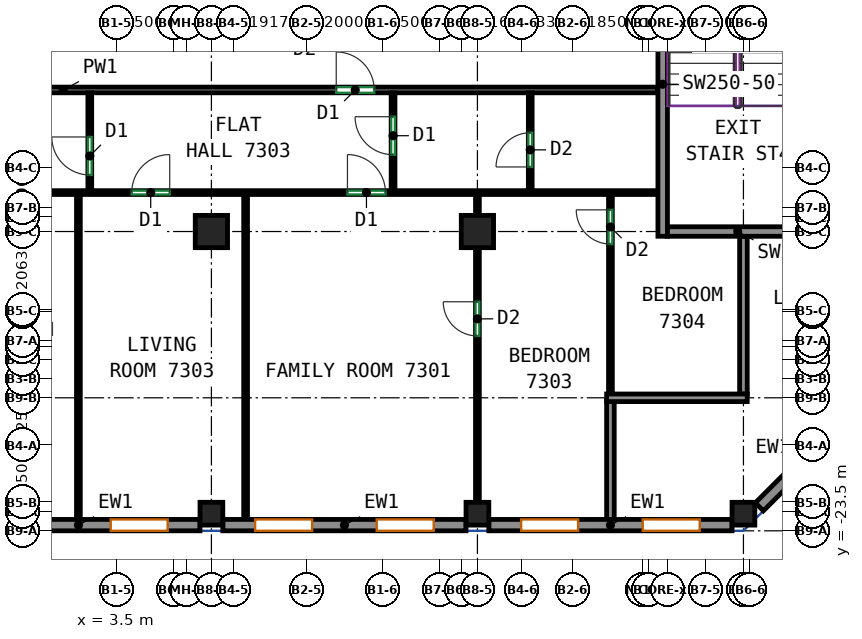
"""IFC4 building model, lengths in metres.
Left out: names, types, materials, properties, quantities, classifications, styles, units other than length and angle.
Written with IfcOpenShell. Run it as: python <this file> out.ifc"""

import sys

from ifc_helpers import new_model, si_unit, direction, frame, frame_2d, origin, origin_2d, place, context, subcontext, project, spatial, rectangle, extrude, source, transform, mapped, element, fill, save


model = new_model("IFC4")
c1 = context("Model", 3, precision=1e-05, world=origin(), true_north=direction((0.0, 1.0)))
c2 = subcontext(c1, "Body", "Model", "MODEL_VIEW")
j1 = project(units=[si_unit("LENGTHUNIT", "METRE"), si_unit("PLANEANGLEUNIT", "RADIAN")], contexts=[c1])
p1 = place(None, origin())
s1 = spatial("IfcSite", under=j1, at=p1, CompositionType="ELEMENT")
p2 = place(p1, origin())
s2 = spatial("IfcBuilding", under=s1, at=p2, CompositionType="ELEMENT")
p3 = place(p2, frame((0.0, 0.0, 295.0)))
s3 = spatial("IfcBuildingStorey", under=s2, at=p3, CompositionType="ELEMENT", Elevation=295.0)
m1 = source(origin(), c2, "Body", "SweptSolid", [
    extrude(rectangle(XDim=0.6, YDim=0.6, at=origin_2d()), origin(), (0.0, 0.0, 1.0), 3.12),
])
p4 = place(p3, frame((6.0, -23.05, 0.0), z_axis=(0.0, 0.0, 1.0), x_axis=(1.0, 0.0, 0.0)))
e1 = element("IfcColumn", 1, at=p4, inside=s3, PredefinedType="COLUMN", context=c2, shape_type="MappedRepresentation", body=[
    mapped(m1, transform((0.0, 0.0, 0.0))),
])
m2 = source(origin(), c2, "Body", "SweptSolid", [
    extrude(rectangle(XDim=0.85, YDim=0.85, at=origin_2d()), origin(), (0.0, 0.0, 1.0), 3.12),
])
p5 = place(p3, frame((6.0, -15.625, 0.0), z_axis=(0.0, 0.0, 1.0), x_axis=(1.0, 0.0, 0.0)))
e2 = element("IfcColumn", 2, at=p5, inside=s3, PredefinedType="COLUMN", context=c2, shape_type="MappedRepresentation", body=[
    mapped(m2, transform((0.0, 0.0, 0.0))),
])
p6 = place(p3, frame((13.0, -23.05, 0.0), z_axis=(0.0, 0.0, 1.0), x_axis=(1.0, 0.0, 0.0)))
e3 = element("IfcColumn", 3, at=p6, inside=s3, PredefinedType="COLUMN", context=c2, shape_type="MappedRepresentation", body=[
    mapped(m1, transform((0.0, 0.0, 0.0))),
])
p7 = place(p3, frame((13.0, -15.625, 0.0), z_axis=(0.0, 0.0, 1.0), x_axis=(1.0, 0.0, 0.0)))
e4 = element("IfcColumn", 4, at=p7, inside=s3, PredefinedType="COLUMN", context=c2, shape_type="MappedRepresentation", body=[
    mapped(m2, transform((0.0, 0.0, 0.0))),
])
p8 = place(p3, frame((20.0, -23.05, 0.0), z_axis=(0.0, 0.0, 1.0), x_axis=(1.0, 0.0, 0.0)))
e5 = element("IfcColumn", 5, at=p8, inside=s3, PredefinedType="COLUMN", context=c2, shape_type="MappedRepresentation", body=[
    mapped(m1, transform((0.0, 0.0, 0.0))),
])
m3 = source(origin(), c2, "Body", "SweptSolid", [
    extrude(rectangle(XDim=8.0, YDim=0.25, at=frame_2d((4.0, 0.0))), origin(), (0.0, 0.0, 1.0), 3.12),
])
p9 = place(p3, frame((17.875, -15.75, 0.0), z_axis=(0.0, 0.0, 1.0), x_axis=(0.0, 1.0, 0.0)))
e6 = element("IfcWall", 6, at=p9, inside=s3, PredefinedType="SHEAR", context=c2, shape_type="MappedRepresentation", body=[
    mapped(m3, transform((0.0, 0.0, 0.0))),
])
m4 = source(origin(), c2, "Body", "SweptSolid", [
    extrude(rectangle(XDim=3.7, YDim=0.25, at=frame_2d((1.85, 0.0))), origin(), (0.0, 0.0, 1.0), 3.12),
])
p10 = place(p3, frame((18.0, -15.625, 0.0), z_axis=(0.0, 0.0, 1.0), x_axis=(1.0, 0.0, 0.0)))
e7 = element("IfcWall", 7, at=p10, inside=s3, PredefinedType="SHEAR", context=c2, shape_type="MappedRepresentation", body=[
    mapped(m4, transform((0.0, 0.0, 0.0))),
])
m5 = source(origin(), c2, "Body", "SweptSolid", [
    extrude(rectangle(XDim=6.4, YDim=0.3, at=frame_2d((3.2, 0.0))), origin(), (0.0, 0.0, 1.0), 3.12),
])
p11 = place(p3, frame((-0.7, -23.35, 0.0), z_axis=(0.0, 0.0, 1.0), x_axis=(1.0, 0.0, 0.0)))
e8 = element("IfcWall", 8, at=p11, inside=s3, PredefinedType="SOLIDWALL", context=c2, shape_type="MappedRepresentation", body=[
    mapped(m5, transform((0.0, 0.0, 0.0))),
])
p12 = place(p11, frame((0.85, 0.0, 0.8)))
e9 = element("IfcOpeningElement", 9, at=p12, cuts=e8, PredefinedType="OPENING", context=c2, shape_type="SweptSolid", body=[
    extrude(rectangle(XDim=1.5, YDim=2.05, at=frame_2d((0.75, 1.025))), frame((0.0, 0.16, 0.0), z_axis=(0.0, -1.0, 0.0), x_axis=(1.0, 0.0, 0.0)), (0.0, 0.0, 1.0), 0.32),
])
p13 = place(p11, frame((4.05, 0.0, 0.8)))
e10 = element("IfcOpeningElement", 10, at=p13, cuts=e8, PredefinedType="OPENING", context=c2, shape_type="SweptSolid", body=[
    extrude(rectangle(XDim=1.5, YDim=2.05, at=frame_2d((0.75, 1.025))), frame((0.0, 0.16, 0.0), z_axis=(0.0, -1.0, 0.0), x_axis=(1.0, 0.0, 0.0)), (0.0, 0.0, 1.0), 0.32),
])
p14 = place(p3, frame((6.3, -23.35, 0.0), z_axis=(0.0, 0.0, 1.0), x_axis=(1.0, 0.0, 0.0)))
e11 = element("IfcWall", 11, at=p14, inside=s3, PredefinedType="SOLIDWALL", context=c2, shape_type="MappedRepresentation", body=[
    mapped(m5, transform((0.0, 0.0, 0.0))),
])
p15 = place(p14, frame((0.85, 0.0, 0.8)))
e12 = element("IfcOpeningElement", 12, at=p15, cuts=e11, PredefinedType="OPENING", context=c2, shape_type="SweptSolid", body=[
    extrude(rectangle(XDim=1.5, YDim=2.05, at=frame_2d((0.75, 1.025))), frame((0.0, 0.16, 0.0), z_axis=(0.0, -1.0, 0.0), x_axis=(1.0, 0.0, 0.0)), (0.0, 0.0, 1.0), 0.32),
])
p16 = place(p14, frame((4.05, 0.0, 0.8)))
e13 = element("IfcOpeningElement", 13, at=p16, cuts=e11, PredefinedType="OPENING", context=c2, shape_type="SweptSolid", body=[
    extrude(rectangle(XDim=1.5, YDim=2.05, at=frame_2d((0.75, 1.025))), frame((0.0, 0.16, 0.0), z_axis=(0.0, -1.0, 0.0), x_axis=(1.0, 0.0, 0.0)), (0.0, 0.0, 1.0), 0.32),
])
p17 = place(p3, frame((13.3, -23.35, 0.0), z_axis=(0.0, 0.0, 1.0), x_axis=(1.0, 0.0, 0.0)))
e14 = element("IfcWall", 14, at=p17, inside=s3, PredefinedType="SOLIDWALL", context=c2, shape_type="MappedRepresentation", body=[
    mapped(m5, transform((0.0, 0.0, 0.0))),
])
p18 = place(p17, frame((0.85, 0.0, 0.8)))
e15 = element("IfcOpeningElement", 15, at=p18, cuts=e14, PredefinedType="OPENING", context=c2, shape_type="SweptSolid", body=[
    extrude(rectangle(XDim=1.5, YDim=2.05, at=frame_2d((0.75, 1.025))), frame((0.0, 0.16, 0.0), z_axis=(0.0, -1.0, 0.0), x_axis=(1.0, 0.0, 0.0)), (0.0, 0.0, 1.0), 0.32),
])
p19 = place(p17, frame((4.05, 0.0, 0.8)))
e16 = element("IfcOpeningElement", 16, at=p19, cuts=e14, PredefinedType="OPENING", context=c2, shape_type="SweptSolid", body=[
    extrude(rectangle(XDim=1.5, YDim=2.05, at=frame_2d((0.75, 1.025))), frame((0.0, 0.16, 0.0), z_axis=(0.0, -1.0, 0.0), x_axis=(1.0, 0.0, 0.0)), (0.0, 0.0, 1.0), 0.32),
])
m6 = source(origin(), c2, "Body", "SweptSolid", [
    extrude(rectangle(XDim=3.783, YDim=0.3, at=frame_2d((1.892, 0.0))), origin(), (0.0, 0.0, 1.0), 3.12),
])
p20 = place(p3, frame((20.419, -22.869, 0.0), z_axis=(0.0, 0.0, 1.0), x_axis=(0.707106781187, 0.707106781187, 0.0)))
e17 = element("IfcWall", 17, at=p20, inside=s3, PredefinedType="SOLIDWALL", context=c2, shape_type="MappedRepresentation", body=[
    mapped(m6, transform((0.0, 0.0, 0.0))),
])
p21 = place(p20, frame((1.75, 0.0, 0.8)))
e18 = element("IfcOpeningElement", 18, at=p21, cuts=e17, PredefinedType="OPENING", context=c2, shape_type="SweptSolid", body=[
    extrude(rectangle(XDim=1.5, YDim=2.05, at=frame_2d((0.75, 1.025))), frame((0.0, 0.16, 0.0), z_axis=(0.0, -1.0, 0.0), x_axis=(1.0, 0.0, 0.0)), (0.0, 0.0, 1.0), 0.32),
])
p22 = place(p3, frame((-13.55, -11.9, 0.0), z_axis=(0.0, 0.0, 1.0), x_axis=(1.0, 0.0, 0.0)))
e19 = element("IfcWall", 19, at=p22, inside=s3, PredefinedType="PARTITIONING", context=c2, shape_type="SweptSolid", body=[
    extrude(rectangle(XDim=31.3, YDim=0.15, at=frame_2d((15.65, 0.0))), origin(), (0.0, 0.0, 1.0), 3.12),
])
p23 = place(p22, frame((3.747, 0.0, 0.0)))
e20 = element("IfcOpeningElement", 20, at=p23, cuts=e19, PredefinedType="OPENING", context=c2, shape_type="SweptSolid", body=[
    extrude(rectangle(XDim=1.0, YDim=2.1, at=frame_2d((0.5, 1.05))), frame((0.0, 0.085, 0.0), z_axis=(0.0, -1.0, 0.0), x_axis=(1.0, 0.0, 0.0)), (0.0, 0.0, 1.0), 0.17),
])
p24 = place(p22, frame((22.835, 0.0, 0.0)))
e21 = element("IfcOpeningElement", 21, at=p24, cuts=e19, PredefinedType="OPENING", context=c2, shape_type="SweptSolid", body=[
    extrude(rectangle(XDim=1.0, YDim=2.1, at=frame_2d((0.5, 1.05))), frame((0.0, 0.085, 0.0), z_axis=(0.0, -1.0, 0.0), x_axis=(1.0, 0.0, 0.0)), (0.0, 0.0, 1.0), 0.17),
])
p25 = place(p3, frame((-13.55, -14.6, 0.0), z_axis=(0.0, 0.0, 1.0), x_axis=(1.0, 0.0, 0.0)))
e22 = element("IfcWall", 22, at=p25, inside=s3, PredefinedType="PARTITIONING", context=c2, shape_type="SweptSolid", body=[
    extrude(rectangle(XDim=31.3, YDim=0.1, at=frame_2d((15.65, 0.0))), origin(), (0.0, 0.0, 1.0), 3.12),
])
p26 = place(p25, frame((0.309, 0.0, 0.0)))
e23 = element("IfcOpeningElement", 23, at=p26, cuts=e22, PredefinedType="OPENING", context=c2, shape_type="SweptSolid", body=[
    extrude(rectangle(XDim=0.9, YDim=2.1, at=frame_2d((0.45, 1.05))), frame((0.0, 0.06, 0.0), z_axis=(0.0, -1.0, 0.0), x_axis=(1.0, 0.0, 0.0)), (0.0, 0.0, 1.0), 0.12),
])
p27 = place(p25, frame((4.103, 0.0, 0.0)))
e24 = element("IfcOpeningElement", 24, at=p27, cuts=e22, PredefinedType="OPENING", context=c2, shape_type="SweptSolid", body=[
    extrude(rectangle(XDim=1.0, YDim=2.1, at=frame_2d((0.5, 1.05))), frame((0.0, 0.06, 0.0), z_axis=(0.0, -1.0, 0.0), x_axis=(1.0, 0.0, 0.0)), (0.0, 0.0, 1.0), 0.12),
])
p28 = place(p25, frame((13.955, 0.0, 0.0)))
e25 = element("IfcOpeningElement", 25, at=p28, cuts=e22, PredefinedType="OPENING", context=c2, shape_type="SweptSolid", body=[
    extrude(rectangle(XDim=0.9, YDim=2.1, at=frame_2d((0.45, 1.05))), frame((0.0, 0.06, 0.0), z_axis=(0.0, -1.0, 0.0), x_axis=(1.0, 0.0, 0.0)), (0.0, 0.0, 1.0), 0.12),
])
p29 = place(p25, frame((17.453, 0.0, 0.0)))
e26 = element("IfcOpeningElement", 26, at=p29, cuts=e22, PredefinedType="OPENING", context=c2, shape_type="SweptSolid", body=[
    extrude(rectangle(XDim=1.0, YDim=2.1, at=frame_2d((0.5, 1.05))), frame((0.0, 0.06, 0.0), z_axis=(0.0, -1.0, 0.0), x_axis=(1.0, 0.0, 0.0)), (0.0, 0.0, 1.0), 0.12),
])
p30 = place(p25, frame((23.13, 0.0, 0.0)))
e27 = element("IfcOpeningElement", 27, at=p30, cuts=e22, PredefinedType="OPENING", context=c2, shape_type="SweptSolid", body=[
    extrude(rectangle(XDim=1.0, YDim=2.1, at=frame_2d((0.5, 1.05))), frame((0.0, 0.06, 0.0), z_axis=(0.0, -1.0, 0.0), x_axis=(1.0, 0.0, 0.0)), (0.0, 0.0, 1.0), 0.12),
])
p31 = place(p3, frame((2.8, -14.55, 0.0), z_axis=(0.0, 0.0, 1.0), x_axis=(0.0, 1.0, 0.0)))
e28 = element("IfcWall", 28, at=p31, inside=s3, PredefinedType="PARTITIONING", context=c2, shape_type="SweptSolid", body=[
    extrude(rectangle(XDim=2.573, YDim=0.1, at=frame_2d((1.287, 0.0))), origin(), (0.0, 0.0, 1.0), 3.12),
])
p32 = place(p31, frame((0.413, 0.0, 0.0)))
e29 = element("IfcOpeningElement", 29, at=p32, cuts=e28, PredefinedType="OPENING", context=c2, shape_type="SweptSolid", body=[
    extrude(rectangle(XDim=1.0, YDim=2.1, at=frame_2d((0.5, 1.05))), frame((0.0, 0.06, 0.0), z_axis=(0.0, -1.0, 0.0), x_axis=(1.0, 0.0, 0.0)), (0.0, 0.0, 1.0), 0.12),
])
p33 = place(p3, frame((10.78, -14.55, 0.0), z_axis=(0.0, 0.0, 1.0), x_axis=(0.0, 1.0, 0.0)))
e30 = element("IfcWall", 30, at=p33, inside=s3, PredefinedType="PARTITIONING", context=c2, shape_type="SweptSolid", body=[
    extrude(rectangle(XDim=2.573, YDim=0.1, at=frame_2d((1.287, 0.0))), origin(), (0.0, 0.0, 1.0), 3.12),
])
p34 = place(p33, frame((0.946, 0.0, 0.0)))
e31 = element("IfcOpeningElement", 31, at=p34, cuts=e30, PredefinedType="OPENING", context=c2, shape_type="SweptSolid", body=[
    extrude(rectangle(XDim=1.0, YDim=2.1, at=frame_2d((0.5, 1.05))), frame((0.0, 0.06, 0.0), z_axis=(0.0, -1.0, 0.0), x_axis=(1.0, 0.0, 0.0)), (0.0, 0.0, 1.0), 0.12),
])
p35 = place(p3, frame((14.39, -14.55, 0.0), z_axis=(0.0, 0.0, 1.0), x_axis=(0.0, 1.0, 0.0)))
e32 = element("IfcWall", 32, at=p35, inside=s3, PredefinedType="PARTITIONING", context=c2, shape_type="SweptSolid", body=[
    extrude(rectangle(XDim=2.573, YDim=0.1, at=frame_2d((1.287, 0.0))), origin(), (0.0, 0.0, 1.0), 3.12),
])
p36 = place(p35, frame((0.624, 0.0, 0.0)))
e33 = element("IfcOpeningElement", 33, at=p36, cuts=e32, PredefinedType="OPENING", context=c2, shape_type="SweptSolid", body=[
    extrude(rectangle(XDim=0.9, YDim=2.1, at=frame_2d((0.45, 1.05))), frame((0.0, 0.06, 0.0), z_axis=(0.0, -1.0, 0.0), x_axis=(1.0, 0.0, 0.0)), (0.0, 0.0, 1.0), 0.12),
])
for number, where, z_axis, x_axis in (
    (34, (2.5, -23.25, 0.0), (0.0, 0.0, 1.0), (0.0, 1.0, 0.0)),
    (35, (6.9, -23.25, 0.0), (0.0, 0.0, 1.0), (0.0, 1.0, 0.0)),
):
    element("IfcWall", number, at=place(p3, frame(where, z_axis=z_axis, x_axis=x_axis)), inside=s3, PredefinedType="PARTITIONING", context=c2, shape_type="SweptSolid", body=[
        extrude(rectangle(XDim=8.598, YDim=0.1, at=frame_2d((4.299, 0.0))), origin(), (0.0, 0.0, 1.0), 3.12),
    ])
p37 = place(p3, frame((13.0, -15.2, 0.0), z_axis=(0.0, 0.0, 1.0), x_axis=(0.0, 1.0, 0.0)))
e36 = element("IfcWall", 36, at=p37, inside=s3, PredefinedType="PARTITIONING", context=c2, shape_type="SweptSolid", body=[
    extrude(rectangle(XDim=0.548, YDim=0.1, at=frame_2d((0.274, 0.0))), origin(), (0.0, 0.0, 1.0), 3.12),
])
p38 = place(p3, frame((13.0, -22.75, 0.0), z_axis=(0.0, 0.0, 1.0), x_axis=(0.0, 1.0, 0.0)))
e37 = element("IfcWall", 37, at=p38, inside=s3, PredefinedType="PARTITIONING", context=c2, shape_type="SweptSolid", body=[
    extrude(rectangle(XDim=6.7, YDim=0.1, at=frame_2d((3.35, 0.0))), origin(), (0.0, 0.0, 1.0), 3.12),
])
p39 = place(p38, frame((4.377, 0.0, 0.0)))
e38 = element("IfcOpeningElement", 38, at=p39, cuts=e37, PredefinedType="OPENING", context=c2, shape_type="SweptSolid", body=[
    extrude(rectangle(XDim=0.9, YDim=2.1, at=frame_2d((0.45, 1.05))), frame((0.0, 0.06, 0.0), z_axis=(0.0, -1.0, 0.0), x_axis=(1.0, 0.0, 0.0)), (0.0, 0.0, 1.0), 0.12),
])
p40 = place(p3, frame((16.5, -19.91, 0.0), z_axis=(0.0, 0.0, 1.0), x_axis=(0.0, 1.0, 0.0)))
e39 = element("IfcWall", 39, at=p40, inside=s3, PredefinedType="PARTITIONING", context=c2, shape_type="SweptSolid", body=[
    extrude(rectangle(XDim=5.258, YDim=0.1, at=frame_2d((2.629, 0.0))), origin(), (0.0, 0.0, 1.0), 3.12),
])
p41 = place(p40, frame((3.955, 0.0, 0.0)))
e40 = element("IfcOpeningElement", 40, at=p41, cuts=e39, PredefinedType="OPENING", context=c2, shape_type="SweptSolid", body=[
    extrude(rectangle(XDim=0.9, YDim=2.1, at=frame_2d((0.45, 1.05))), frame((0.0, 0.06, 0.0), z_axis=(0.0, -1.0, 0.0), x_axis=(1.0, 0.0, 0.0)), (0.0, 0.0, 1.0), 0.12),
])
p42 = place(p3, frame((16.5, -23.25, 0.0), z_axis=(0.0, 0.0, 1.0), x_axis=(0.0, 1.0, 0.0)))
e41 = element("IfcWall", 41, at=p42, inside=s3, PredefinedType="PARTITIONING", context=c2, shape_type="SweptSolid", body=[
    extrude(rectangle(XDim=3.16, YDim=0.2, at=frame_2d((1.58, 0.0))), origin(), (0.0, 0.0, 1.0), 3.12),
])
p43 = place(p3, frame((20.0, -19.9, 0.0), z_axis=(0.0, 0.0, 1.0), x_axis=(0.0, 1.0, 0.0)))
e42 = element("IfcWall", 42, at=p43, inside=s3, PredefinedType="PARTITIONING", context=c2, shape_type="SweptSolid", body=[
    extrude(rectangle(XDim=4.15, YDim=0.2, at=frame_2d((2.075, 0.0))), origin(), (0.0, 0.0, 1.0), 3.12),
])
p44 = place(p3, frame((16.4, -20.0, 0.0), z_axis=(0.0, 0.0, 1.0), x_axis=(1.0, 0.0, 0.0)))
e43 = element("IfcWall", 43, at=p44, inside=s3, PredefinedType="PARTITIONING", context=c2, shape_type="SweptSolid", body=[
    extrude(rectangle(XDim=3.7, YDim=0.2, at=frame_2d((1.85, 0.0))), origin(), (0.0, 0.0, 1.0), 3.12),
])
p45 = place(p13, origin())
e44 = element("IfcWindow", 44, at=p45, inside=s3, PartitioningType="SINGLE_PANEL", PredefinedType="WINDOW", context=c2, shape_type="SweptSolid", body=[
    extrude(rectangle(XDim=1.5, YDim=2.05, at=frame_2d((0.75, 1.025))), frame((0.0, 0.03, 0.0), z_axis=(0.0, -1.0, 0.0), x_axis=(1.0, 0.0, 0.0)), (0.0, 0.0, 1.0), 0.06),
])
fill(e10, e44)
p46 = place(p15, origin())
e45 = element("IfcWindow", 45, at=p46, inside=s3, PartitioningType="SINGLE_PANEL", PredefinedType="WINDOW", context=c2, shape_type="SweptSolid", body=[
    extrude(rectangle(XDim=1.5, YDim=2.05, at=frame_2d((0.75, 1.025))), frame((0.0, 0.03, 0.0), z_axis=(0.0, -1.0, 0.0), x_axis=(1.0, 0.0, 0.0)), (0.0, 0.0, 1.0), 0.06),
])
fill(e12, e45)
p47 = place(p16, origin())
e46 = element("IfcWindow", 46, at=p47, inside=s3, PartitioningType="SINGLE_PANEL", PredefinedType="WINDOW", context=c2, shape_type="SweptSolid", body=[
    extrude(rectangle(XDim=1.5, YDim=2.05, at=frame_2d((0.75, 1.025))), frame((0.0, 0.03, 0.0), z_axis=(0.0, -1.0, 0.0), x_axis=(1.0, 0.0, 0.0)), (0.0, 0.0, 1.0), 0.06),
])
fill(e13, e46)
p48 = place(p18, origin())
e47 = element("IfcWindow", 47, at=p48, inside=s3, PartitioningType="SINGLE_PANEL", PredefinedType="WINDOW", context=c2, shape_type="SweptSolid", body=[
    extrude(rectangle(XDim=1.5, YDim=2.05, at=frame_2d((0.75, 1.025))), frame((0.0, 0.03, 0.0), z_axis=(0.0, -1.0, 0.0), x_axis=(1.0, 0.0, 0.0)), (0.0, 0.0, 1.0), 0.06),
])
fill(e15, e47)
p49 = place(p19, origin())
e48 = element("IfcWindow", 48, at=p49, inside=s3, PartitioningType="SINGLE_PANEL", PredefinedType="WINDOW", context=c2, shape_type="SweptSolid", body=[
    extrude(rectangle(XDim=1.5, YDim=2.05, at=frame_2d((0.75, 1.025))), frame((0.0, 0.03, 0.0), z_axis=(0.0, -1.0, 0.0), x_axis=(1.0, 0.0, 0.0)), (0.0, 0.0, 1.0), 0.06),
])
fill(e16, e48)
p50 = place(p39, origin())
e49 = element("IfcDoor", 49, at=p50, inside=s3, OperationType="SINGLE_SWING_RIGHT", PredefinedType="DOOR", context=c2, shape_type="SweptSolid", body=[
    extrude(rectangle(XDim=0.9, YDim=2.1, at=frame_2d((0.45, 1.05))), frame((0.0, 0.025, 0.0), z_axis=(0.0, -1.0, 0.0), x_axis=(1.0, 0.0, 0.0)), (0.0, 0.0, 1.0), 0.05),
])
fill(e38, e49)
p51 = place(p41, origin())
e50 = element("IfcDoor", 50, at=p51, inside=s3, OperationType="SINGLE_SWING_RIGHT", PredefinedType="DOOR", context=c2, shape_type="SweptSolid", body=[
    extrude(rectangle(XDim=0.9, YDim=2.1, at=frame_2d((0.45, 1.05))), frame((0.0, 0.025, 0.0), z_axis=(0.0, -1.0, 0.0), x_axis=(1.0, 0.0, 0.0)), (0.0, 0.0, 1.0), 0.05),
])
fill(e40, e50)
p52 = place(p29, origin())
e51 = element("IfcDoor", 51, at=p52, inside=s3, OperationType="SINGLE_SWING_RIGHT", PredefinedType="DOOR", context=c2, shape_type="SweptSolid", body=[
    extrude(rectangle(XDim=1.0, YDim=2.1, at=frame_2d((0.5, 1.05))), frame((0.0, 0.025, 0.0), z_axis=(0.0, -1.0, 0.0), x_axis=(1.0, 0.0, 0.0)), (0.0, 0.0, 1.0), 0.05),
])
fill(e26, e51)
p53 = place(p30, origin())
e52 = element("IfcDoor", 52, at=p53, inside=s3, OperationType="SINGLE_SWING_LEFT", PredefinedType="DOOR", context=c2, shape_type="SweptSolid", body=[
    extrude(rectangle(XDim=1.0, YDim=2.1, at=frame_2d((0.5, 1.05))), frame((0.0, 0.025, 0.0), z_axis=(0.0, -1.0, 0.0), x_axis=(1.0, 0.0, 0.0)), (0.0, 0.0, 1.0), 0.05),
])
fill(e27, e52)
p54 = place(p32, origin())
e53 = element("IfcDoor", 53, at=p54, inside=s3, OperationType="SINGLE_SWING_RIGHT", PredefinedType="DOOR", context=c2, shape_type="SweptSolid", body=[
    extrude(rectangle(XDim=1.0, YDim=2.1, at=frame_2d((0.5, 1.05))), frame((0.0, 0.025, 0.0), z_axis=(0.0, -1.0, 0.0), x_axis=(1.0, 0.0, 0.0)), (0.0, 0.0, 1.0), 0.05),
])
fill(e29, e53)
p55 = place(p36, origin())
e54 = element("IfcDoor", 54, at=p55, inside=s3, OperationType="SINGLE_SWING_LEFT", PredefinedType="DOOR", context=c2, shape_type="SweptSolid", body=[
    extrude(rectangle(XDim=0.9, YDim=2.1, at=frame_2d((0.45, 1.05))), frame((0.0, 0.025, 0.0), z_axis=(0.0, -1.0, 0.0), x_axis=(1.0, 0.0, 0.0)), (0.0, 0.0, 1.0), 0.05),
])
fill(e33, e54)
p56 = place(p34, origin())
e55 = element("IfcDoor", 55, at=p56, inside=s3, OperationType="SINGLE_SWING_RIGHT", PredefinedType="DOOR", context=c2, shape_type="SweptSolid", body=[
    extrude(rectangle(XDim=1.0, YDim=2.1, at=frame_2d((0.5, 1.05))), frame((0.0, 0.025, 0.0), z_axis=(0.0, -1.0, 0.0), x_axis=(1.0, 0.0, 0.0)), (0.0, 0.0, 1.0), 0.05),
])
fill(e31, e55)
p57 = place(p24, origin())
e56 = element("IfcDoor", 56, at=p57, inside=s3, OperationType="SINGLE_SWING_LEFT", PredefinedType="DOOR", context=c2, shape_type="SweptSolid", body=[
    extrude(rectangle(XDim=1.0, YDim=2.1, at=frame_2d((0.5, 1.05))), frame((0.0, 0.025, 0.0), z_axis=(0.0, -1.0, 0.0), x_axis=(1.0, 0.0, 0.0)), (0.0, 0.0, 1.0), 0.05),
])
fill(e21, e56)
save(model, sys.argv[1])
